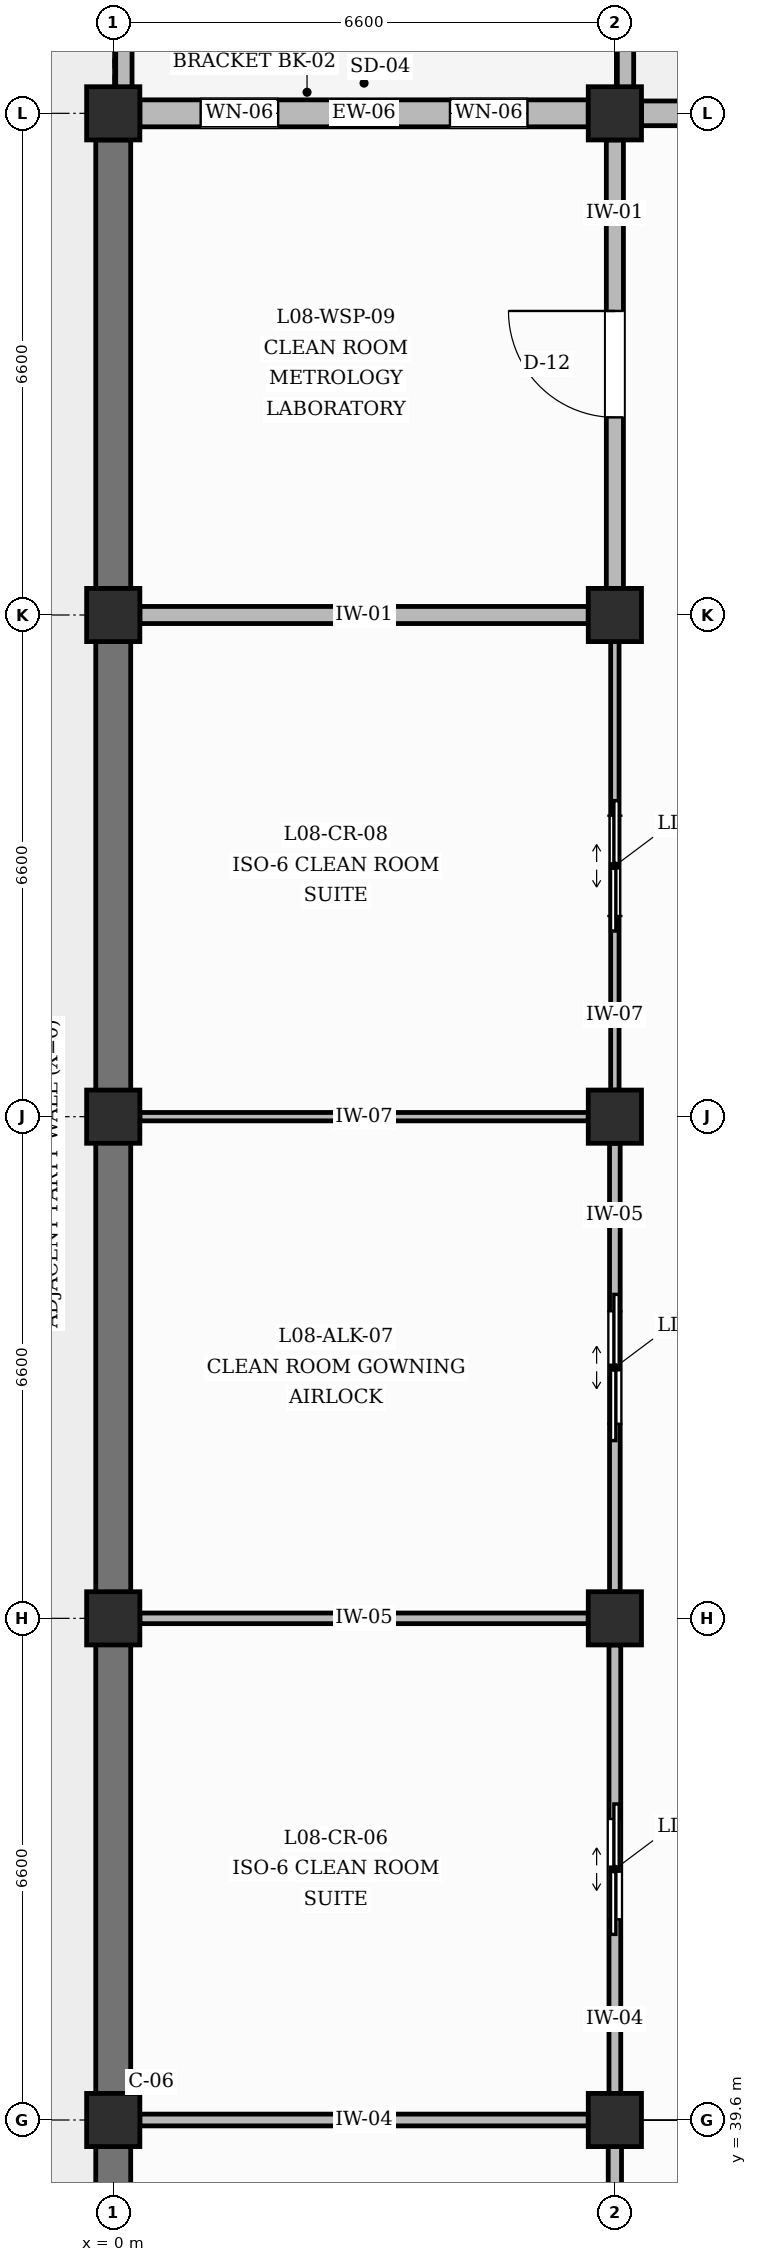
"""IFC4 building model, lengths in metres.
Left out: names, types, materials, properties, quantities, classifications, styles, units other than length and angle.
Written with IfcOpenShell. Run it as: python <this file> out.ifc"""

import sys

from ifc_helpers import new_model, si_unit, direction, frame, frame_2d, origin, origin_2d, place, context, subcontext, project, spatial, rectangle, extrude, element, fill, save


model = new_model("IFC4")
c1 = context("Model", 3, precision=1e-05, world=origin(), true_north=direction((0.0, 1.0)))
c2 = subcontext(c1, "Body", "Model", "MODEL_VIEW")
j1 = project(units=[si_unit("LENGTHUNIT", "METRE"), si_unit("PLANEANGLEUNIT", "RADIAN")], contexts=[c1])
p1 = place(None, origin())
s1 = spatial("IfcSite", under=j1, at=p1, CompositionType="ELEMENT")
p2 = place(p1, origin())
s2 = spatial("IfcBuilding", under=s1, at=p2, CompositionType="ELEMENT")
p3 = place(p2, frame((0.0, 0.0, 35.4)))
s3 = spatial("IfcBuildingStorey", under=s2, at=p3, CompositionType="ELEMENT", Elevation=35.4)
for number, where, z_axis, x_axis in (
    (1, (0.0, 39.6, 0.0), (0.0, 0.0, 1.0), (1.0, 0.0, 0.0)),
    (2, (0.0, 46.2, 0.0), (0.0, 0.0, 1.0), (1.0, 0.0, 0.0)),
    (3, (0.0, 52.8, 0.0), (0.0, 0.0, 1.0), (1.0, 0.0, 0.0)),
    (4, (0.0, 59.4, 0.0), (0.0, 0.0, 1.0), (1.0, 0.0, 0.0)),
    (5, (0.0, 66.0, 0.0), (0.0, 0.0, 1.0), (1.0, 0.0, 0.0)),
    (6, (6.6, 39.6, 0.0), (0.0, 0.0, 1.0), (1.0, 0.0, 0.0)),
    (7, (6.6, 46.2, 0.0), (0.0, 0.0, 1.0), (1.0, 0.0, 0.0)),
    (8, (6.6, 52.8, 0.0), (0.0, 0.0, 1.0), (1.0, 0.0, 0.0)),
    (9, (6.6, 59.4, 0.0), (0.0, 0.0, 1.0), (1.0, 0.0, 0.0)),
    (10, (6.6, 66.0, 0.0), (0.0, 0.0, 1.0), (1.0, 0.0, 0.0)),
):
    element("IfcColumn", number, at=place(p3, frame(where, z_axis=z_axis, x_axis=x_axis)), inside=s3, PredefinedType="COLUMN", context=c2, shape_type="SweptSolid", body=[
        extrude(rectangle(XDim=0.7, YDim=0.7, at=origin_2d()), origin(), (0.0, 0.0, 1.0), 4.2),
    ])
p4 = place(p3, frame((0.0, 33.35, 0.0), z_axis=(0.0, 0.0, 1.0), x_axis=(0.0, 1.0, 0.0)))
e11 = element("IfcWall", 11, at=p4, inside=s3, PredefinedType="SOLIDWALL", context=c2, shape_type="SweptSolid", body=[
    extrude(rectangle(XDim=5.9, YDim=0.46, at=frame_2d((2.95, 0.0))), origin(), (0.0, 0.0, 1.0), 3.28),
])
p5 = place(p3, frame((0.0, 39.95, 0.0), z_axis=(0.0, 0.0, 1.0), x_axis=(0.0, 1.0, 0.0)))
e12 = element("IfcWall", 12, at=p5, inside=s3, PredefinedType="SOLIDWALL", context=c2, shape_type="SweptSolid", body=[
    extrude(rectangle(XDim=5.9, YDim=0.46, at=frame_2d((2.95, 0.0))), origin(), (0.0, 0.0, 1.0), 3.28),
])
p6 = place(p3, frame((0.0, 46.55, 0.0), z_axis=(0.0, 0.0, 1.0), x_axis=(0.0, 1.0, 0.0)))
e13 = element("IfcWall", 13, at=p6, inside=s3, PredefinedType="SOLIDWALL", context=c2, shape_type="SweptSolid", body=[
    extrude(rectangle(XDim=5.9, YDim=0.46, at=frame_2d((2.95, 0.0))), origin(), (0.0, 0.0, 1.0), 3.28),
])
p7 = place(p3, frame((0.0, 53.15, 0.0), z_axis=(0.0, 0.0, 1.0), x_axis=(0.0, 1.0, 0.0)))
e14 = element("IfcWall", 14, at=p7, inside=s3, PredefinedType="SOLIDWALL", context=c2, shape_type="SweptSolid", body=[
    extrude(rectangle(XDim=5.9, YDim=0.46, at=frame_2d((2.95, 0.0))), origin(), (0.0, 0.0, 1.0), 3.28),
])
p8 = place(p3, frame((0.35, 66.0, 0.0), z_axis=(0.0, 0.0, 1.0), x_axis=(1.0, 0.0, 0.0)))
e15 = element("IfcWall", 15, at=p8, inside=s3, PredefinedType="SOLIDWALL", context=c2, shape_type="SweptSolid", body=[
    extrude(rectangle(XDim=5.9, YDim=0.355, at=frame_2d((2.95, 0.0))), origin(), (0.0, 0.0, 1.0), 3.28),
])
p9 = place(p8, frame((0.8, 0.0, 0.95)))
e16 = element("IfcOpeningElement", 16, at=p9, cuts=e15, PredefinedType="OPENING", context=c2, shape_type="SweptSolid", body=[
    extrude(rectangle(XDim=1.02, YDim=1.52, at=frame_2d((0.51, 0.76))), frame((0.0, 0.188, 0.0), z_axis=(0.0, -1.0, 0.0), x_axis=(1.0, 0.0, 0.0)), (0.0, 0.0, 1.0), 0.375),
])
p10 = place(p8, frame((4.08, 0.0, 0.95)))
e17 = element("IfcOpeningElement", 17, at=p10, cuts=e15, PredefinedType="OPENING", context=c2, shape_type="SweptSolid", body=[
    extrude(rectangle(XDim=1.02, YDim=1.52, at=frame_2d((0.51, 0.76))), frame((0.0, 0.188, 0.0), z_axis=(0.0, -1.0, 0.0), x_axis=(1.0, 0.0, 0.0)), (0.0, 0.0, 1.0), 0.375),
])
p11 = place(p3, frame((0.0, 59.75, 0.0), z_axis=(0.0, 0.0, 1.0), x_axis=(0.0, 1.0, 0.0)))
e18 = element("IfcWall", 18, at=p11, inside=s3, PredefinedType="SOLIDWALL", context=c2, shape_type="SweptSolid", body=[
    extrude(rectangle(XDim=5.9, YDim=0.46, at=frame_2d((2.95, 0.0))), origin(), (0.0, 0.0, 1.0), 3.28),
])
p12 = place(p3, frame((6.95, 66.0, 0.0), z_axis=(0.0, 0.0, 1.0), x_axis=(1.0, 0.0, 0.0)))
e19 = element("IfcWall", 19, at=p12, inside=s3, PredefinedType="SOLIDWALL", context=c2, shape_type="SweptSolid", body=[
    extrude(rectangle(XDim=5.9, YDim=0.325, at=frame_2d((2.95, 0.0))), origin(), (0.0, 0.0, 1.0), 3.28),
])
p13 = place(p12, frame((2.3, 0.0, 0.0)))
e20 = element("IfcOpeningElement", 20, at=p13, cuts=e19, PredefinedType="OPENING", context=c2, shape_type="SweptSolid", body=[
    extrude(rectangle(XDim=1.3, YDim=2.2, at=frame_2d((0.65, 1.1))), frame((0.0, 0.172, 0.0), z_axis=(0.0, -1.0, 0.0), x_axis=(1.0, 0.0, 0.0)), (0.0, 0.0, 1.0), 0.345),
])
for number, where, z_axis, x_axis in (
    (21, (6.74, 66.3, 0.0), (0.0, 0.0, 1.0), (0.0, 1.0, 0.0)),
    (22, (0.14, 66.3, 0.0), (0.0, 0.0, 1.0), (0.0, 1.0, 0.0)),
):
    element("IfcWall", number, at=place(p3, frame(where, z_axis=z_axis, x_axis=x_axis)), inside=s3, PredefinedType="PARAPET", context=c2, shape_type="SweptSolid", body=[
        extrude(rectangle(XDim=6.0, YDim=0.215, at=frame_2d((3.0, 0.0))), origin(), (0.0, 0.0, 1.0), 1.15),
    ])
p14 = place(p3, frame((6.6, 33.35, 0.0), z_axis=(0.0, 0.0, 1.0), x_axis=(0.0, 1.0, 0.0)))
e23 = element("IfcWall", 23, at=p14, inside=s3, PredefinedType="PARTITIONING", context=c2, shape_type="SweptSolid", body=[
    extrude(rectangle(XDim=5.9, YDim=0.175, at=frame_2d((2.95, 0.0))), origin(), (0.0, 0.0, 1.0), 3.18),
])
p15 = place(p14, frame((2.21, 0.0, 0.0)))
e24 = element("IfcOpeningElement", 24, at=p15, cuts=e23, PredefinedType="OPENING", context=c2, shape_type="SweptSolid", body=[
    extrude(rectangle(XDim=1.48, YDim=2.25, at=frame_2d((0.74, 1.125))), frame((0.0, 0.097, 0.0), z_axis=(0.0, -1.0, 0.0), x_axis=(1.0, 0.0, 0.0)), (0.0, 0.0, 1.0), 0.195),
])
p16 = place(p3, frame((0.35, 39.6, 0.0), z_axis=(0.0, 0.0, 1.0), x_axis=(1.0, 0.0, 0.0)))
e25 = element("IfcWall", 25, at=p16, inside=s3, PredefinedType="PARTITIONING", context=c2, shape_type="SweptSolid", body=[
    extrude(rectangle(XDim=5.9, YDim=0.155, at=frame_2d((2.95, 0.0))), origin(), (0.0, 0.0, 1.0), 3.18),
])
p17 = place(p3, frame((6.6, 39.95, 0.0), z_axis=(0.0, 0.0, 1.0), x_axis=(0.0, 1.0, 0.0)))
e26 = element("IfcWall", 26, at=p17, inside=s3, PredefinedType="PARTITIONING", context=c2, shape_type="SweptSolid", body=[
    extrude(rectangle(XDim=5.9, YDim=0.155, at=frame_2d((2.95, 0.0))), origin(), (0.0, 0.0, 1.0), 3.18),
])
p18 = place(p17, frame((2.29, 0.0, 0.0)))
e27 = element("IfcOpeningElement", 27, at=p18, cuts=e26, PredefinedType="OPENING", context=c2, shape_type="SweptSolid", body=[
    extrude(rectangle(XDim=1.32, YDim=2.2, at=frame_2d((0.66, 1.1))), frame((0.0, 0.087, 0.0), z_axis=(0.0, -1.0, 0.0), x_axis=(1.0, 0.0, 0.0)), (0.0, 0.0, 1.0), 0.175),
])
p19 = place(p3, frame((0.35, 46.2, 0.0), z_axis=(0.0, 0.0, 1.0), x_axis=(1.0, 0.0, 0.0)))
e28 = element("IfcWall", 28, at=p19, inside=s3, PredefinedType="PARTITIONING", context=c2, shape_type="SweptSolid", body=[
    extrude(rectangle(XDim=5.9, YDim=0.14, at=frame_2d((2.95, 0.0))), origin(), (0.0, 0.0, 1.0), 3.18),
])
p20 = place(p3, frame((6.6, 46.55, 0.0), z_axis=(0.0, 0.0, 1.0), x_axis=(0.0, 1.0, 0.0)))
e29 = element("IfcWall", 29, at=p20, inside=s3, PredefinedType="PARTITIONING", context=c2, shape_type="SweptSolid", body=[
    extrude(rectangle(XDim=5.9, YDim=0.14, at=frame_2d((2.95, 0.0))), origin(), (0.0, 0.0, 1.0), 3.18),
])
p21 = place(p20, frame((2.21, 0.0, 0.0)))
e30 = element("IfcOpeningElement", 30, at=p21, cuts=e29, PredefinedType="OPENING", context=c2, shape_type="SweptSolid", body=[
    extrude(rectangle(XDim=1.48, YDim=2.25, at=frame_2d((0.74, 1.125))), frame((0.0, 0.08, 0.0), z_axis=(0.0, -1.0, 0.0), x_axis=(1.0, 0.0, 0.0)), (0.0, 0.0, 1.0), 0.16),
])
p22 = place(p3, frame((0.35, 52.8, 0.0), z_axis=(0.0, 0.0, 1.0), x_axis=(1.0, 0.0, 0.0)))
e31 = element("IfcWall", 31, at=p22, inside=s3, PredefinedType="PARTITIONING", context=c2, shape_type="SweptSolid", body=[
    extrude(rectangle(XDim=5.9, YDim=0.11, at=frame_2d((2.95, 0.0))), origin(), (0.0, 0.0, 1.0), 3.18),
])
p23 = place(p3, frame((6.6, 53.15, 0.0), z_axis=(0.0, 0.0, 1.0), x_axis=(0.0, 1.0, 0.0)))
e32 = element("IfcWall", 32, at=p23, inside=s3, PredefinedType="PARTITIONING", context=c2, shape_type="SweptSolid", body=[
    extrude(rectangle(XDim=5.9, YDim=0.11, at=frame_2d((2.95, 0.0))), origin(), (0.0, 0.0, 1.0), 3.18),
])
p24 = place(p23, frame((2.29, 0.0, 0.0)))
e33 = element("IfcOpeningElement", 33, at=p24, cuts=e32, PredefinedType="OPENING", context=c2, shape_type="SweptSolid", body=[
    extrude(rectangle(XDim=1.32, YDim=2.2, at=frame_2d((0.66, 1.1))), frame((0.0, 0.065, 0.0), z_axis=(0.0, -1.0, 0.0), x_axis=(1.0, 0.0, 0.0)), (0.0, 0.0, 1.0), 0.13),
])
p25 = place(p3, frame((0.35, 59.4, 0.0), z_axis=(0.0, 0.0, 1.0), x_axis=(1.0, 0.0, 0.0)))
e34 = element("IfcWall", 34, at=p25, inside=s3, PredefinedType="PARTITIONING", context=c2, shape_type="SweptSolid", body=[
    extrude(rectangle(XDim=5.9, YDim=0.225, at=frame_2d((2.95, 0.0))), origin(), (0.0, 0.0, 1.0), 3.18),
])
p26 = place(p3, frame((6.6, 59.75, 0.0), z_axis=(0.0, 0.0, 1.0), x_axis=(0.0, 1.0, 0.0)))
e35 = element("IfcWall", 35, at=p26, inside=s3, PredefinedType="PARTITIONING", context=c2, shape_type="SweptSolid", body=[
    extrude(rectangle(XDim=5.9, YDim=0.225, at=frame_2d((2.95, 0.0))), origin(), (0.0, 0.0, 1.0), 3.18),
])
p27 = place(p26, frame((2.25, 0.0, 0.0)))
e36 = element("IfcOpeningElement", 36, at=p27, cuts=e35, PredefinedType="OPENING", context=c2, shape_type="SweptSolid", body=[
    extrude(rectangle(XDim=1.4, YDim=2.25, at=frame_2d((0.7, 1.125))), frame((0.0, 0.123, 0.0), z_axis=(0.0, -1.0, 0.0), x_axis=(1.0, 0.0, 0.0)), (0.0, 0.0, 1.0), 0.245),
])
p28 = place(p9, origin())
e37 = element("IfcWindow", 37, at=p28, inside=s3, PartitioningType="SINGLE_PANEL", PredefinedType="WINDOW", context=c2, shape_type="SweptSolid", body=[
    extrude(rectangle(XDim=1.02, YDim=1.52, at=frame_2d((0.51, 0.76))), frame((0.0, 0.03, 0.0), z_axis=(0.0, -1.0, 0.0), x_axis=(1.0, 0.0, 0.0)), (0.0, 0.0, 1.0), 0.06),
])
fill(e16, e37)
p29 = place(p10, origin())
e38 = element("IfcWindow", 38, at=p29, inside=s3, PartitioningType="SINGLE_PANEL", PredefinedType="WINDOW", context=c2, shape_type="SweptSolid", body=[
    extrude(rectangle(XDim=1.02, YDim=1.52, at=frame_2d((0.51, 0.76))), frame((0.0, 0.03, 0.0), z_axis=(0.0, -1.0, 0.0), x_axis=(1.0, 0.0, 0.0)), (0.0, 0.0, 1.0), 0.06),
])
fill(e17, e38)
p30 = place(p18, origin())
e39 = element("IfcDoor", 39, at=p30, inside=s3, OperationType="DOUBLE_DOOR_SLIDING", PredefinedType="USERDEFINED", context=c2, shape_type="SweptSolid", body=[
    extrude(rectangle(XDim=1.32, YDim=2.2, at=frame_2d((0.66, 1.1))), frame((0.0, 0.025, 0.0), z_axis=(0.0, -1.0, 0.0), x_axis=(1.0, 0.0, 0.0)), (0.0, 0.0, 1.0), 0.05),
])
fill(e27, e39)
p31 = place(p21, origin())
e40 = element("IfcDoor", 40, at=p31, inside=s3, OperationType="DOUBLE_DOOR_SLIDING", PredefinedType="USERDEFINED", context=c2, shape_type="SweptSolid", body=[
    extrude(rectangle(XDim=1.48, YDim=2.25, at=frame_2d((0.74, 1.125))), frame((0.0, 0.025, 0.0), z_axis=(0.0, -1.0, 0.0), x_axis=(1.0, 0.0, 0.0)), (0.0, 0.0, 1.0), 0.05),
])
fill(e30, e40)
p32 = place(p24, origin())
e41 = element("IfcDoor", 41, at=p32, inside=s3, OperationType="DOUBLE_DOOR_SLIDING", PredefinedType="USERDEFINED", context=c2, shape_type="SweptSolid", body=[
    extrude(rectangle(XDim=1.32, YDim=2.2, at=frame_2d((0.66, 1.1))), frame((0.0, 0.025, 0.0), z_axis=(0.0, -1.0, 0.0), x_axis=(1.0, 0.0, 0.0)), (0.0, 0.0, 1.0), 0.05),
])
fill(e33, e41)
p33 = place(p27, origin())
e42 = element("IfcDoor", 42, at=p33, inside=s3, OperationType="SINGLE_SWING_RIGHT", PredefinedType="DOOR", context=c2, shape_type="SweptSolid", body=[
    extrude(rectangle(XDim=1.4, YDim=2.25, at=frame_2d((0.7, 1.125))), frame((0.0, 0.025, 0.0), z_axis=(0.0, -1.0, 0.0), x_axis=(1.0, 0.0, 0.0)), (0.0, 0.0, 1.0), 0.05),
])
fill(e36, e42)
save(model, sys.argv[1])
